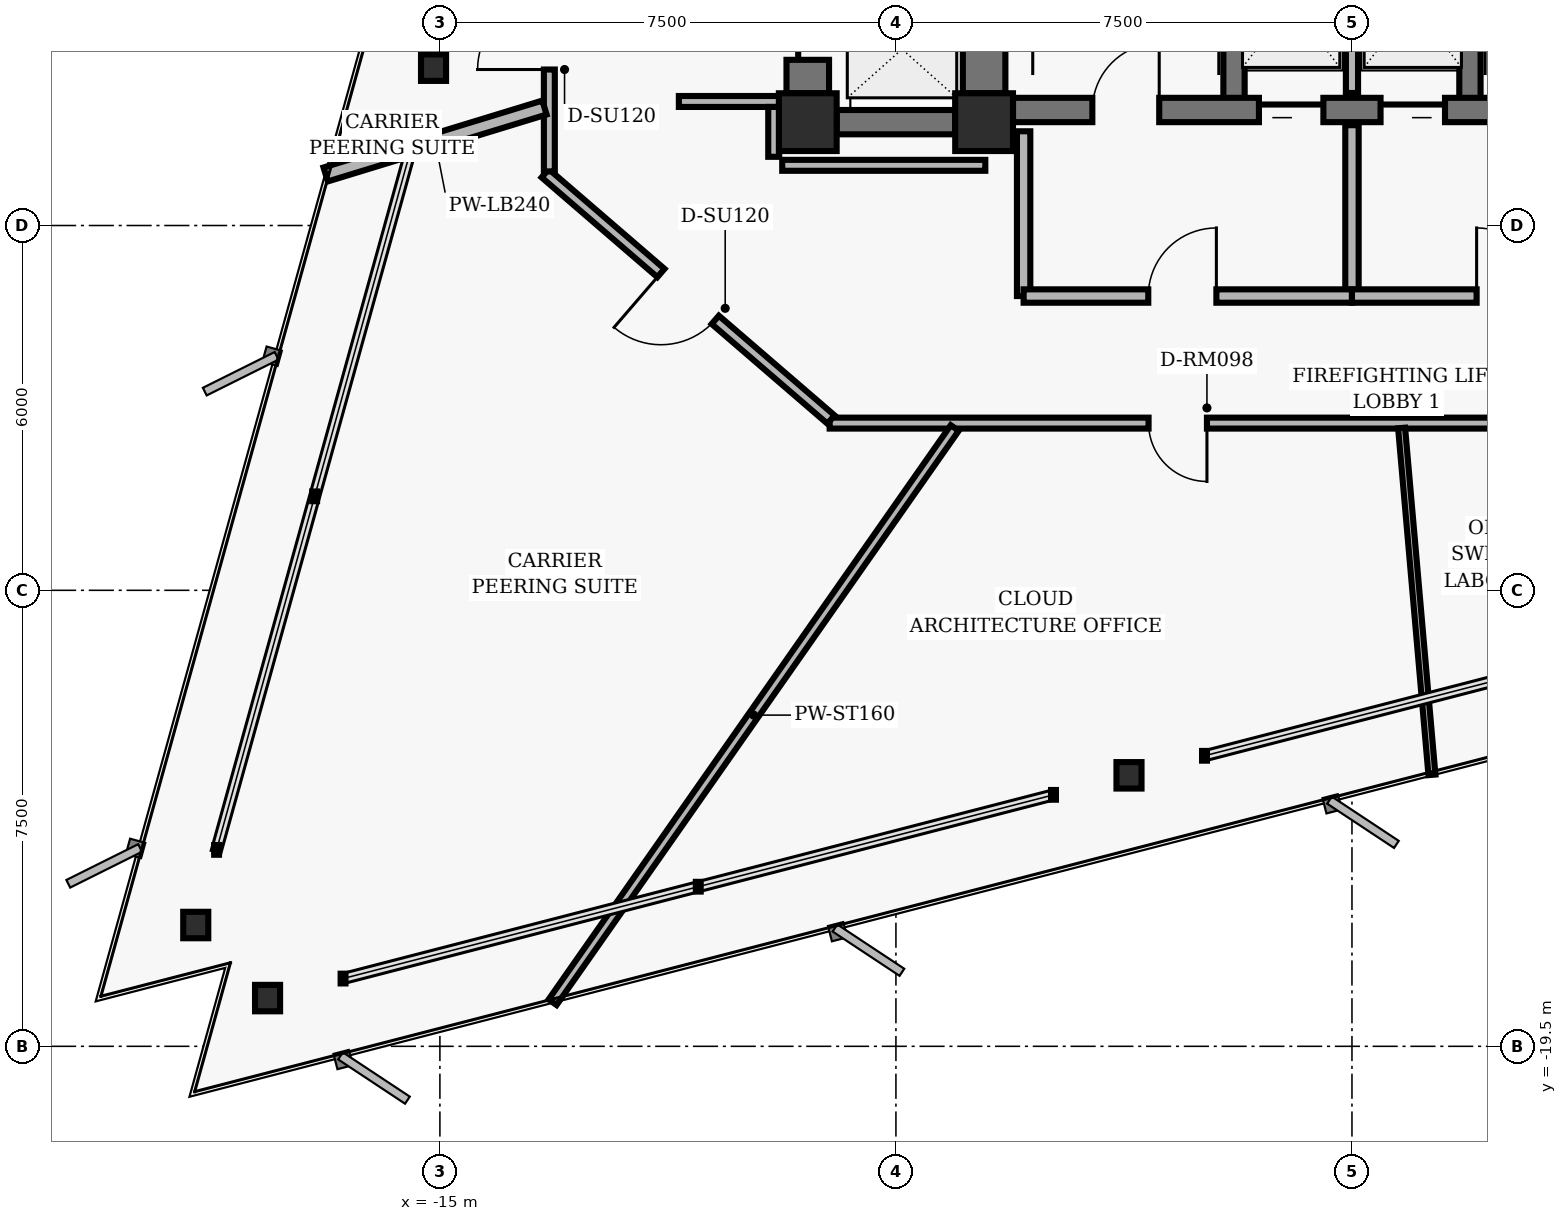
"""IFC4 building model, lengths in metres.
Left out: names, types, materials, properties, quantities, classifications, styles, units other than length and angle.
Written with IfcOpenShell. Run it as: python <this file> out.ifc"""

import sys

from ifc_helpers import new_model, si_unit, direction, frame, frame_2d, origin, origin_2d, place, context, subcontext, project, spatial, rectangle, hollow_rectangle, i_section, extrude, element, fill, save


model = new_model("IFC4")
c1 = context("Model", 3, precision=1e-05, world=origin(), true_north=direction((0.0, 1.0)))
c2 = subcontext(c1, "Body", "Model", "MODEL_VIEW")
j1 = project(units=[si_unit("LENGTHUNIT", "METRE"), si_unit("PLANEANGLEUNIT", "RADIAN")], contexts=[c1])
p1 = place(None, origin())
s1 = spatial("IfcSite", under=j1, at=p1, CompositionType="ELEMENT")
p2 = place(p1, origin())
s2 = spatial("IfcBuilding", under=s1, at=p2, CompositionType="ELEMENT")
p3 = place(p2, frame((0.0, 0.0, 94.72)))
s3 = spatial("IfcBuildingStorey", under=s2, at=p3, CompositionType="ELEMENT", Elevation=94.72)
for number, where, z_axis, x_axis in (
    (1, (-6.05, -4.3, 0.0), (0.0, 0.0, 1.0), (1.0, 0.0, 0.0)),
    (2, (-8.95, -4.3, 0.0), (0.0, 0.0, 1.0), (1.0, 0.0, 0.0)),
):
    element("IfcColumn", number, at=place(p3, frame(where, z_axis=z_axis, x_axis=x_axis)), inside=s3, PredefinedType="COLUMN", context=c2, shape_type="SweptSolid", body=[
        extrude(hollow_rectangle(XDim=0.95, YDim=0.95, WallThickness=0.06, InnerFilletRadius=0.02, OuterFilletRadius=0.04, at=origin_2d()), origin(), (0.0, 0.0, 1.0), 3.04),
    ])
p4 = place(p3, frame((-6.05, -3.825, 0.0), z_axis=(0.0, 0.0, 1.0), x_axis=(0.0, 1.0, 0.0)))
e3 = element("IfcWall", 3, at=p4, inside=s3, PredefinedType="SHEAR", context=c2, shape_type="SweptSolid", body=[
    extrude(rectangle(XDim=3.35, YDim=0.7, at=frame_2d((1.675, 0.0))), origin(), (0.0, 0.0, 1.0), 2.788),
])
for number, where, z_axis, x_axis in (
    (4, (-1.94, -4.1, 0.0), (0.0, 0.0, 1.0), (0.0, 1.0, 0.0)),
    (5, (1.94, -4.1, 0.0), (0.0, 0.0, 1.0), (0.0, 1.0, 0.0)),
):
    element("IfcWall", number, at=place(p3, frame(where, z_axis=z_axis, x_axis=x_axis)), inside=s3, PredefinedType="SHEAR", context=c2, shape_type="SweptSolid", body=[
        extrude(rectangle(XDim=8.2, YDim=0.35, at=frame_2d((4.1, 0.0))), origin(), (0.0, 0.0, 1.0), 2.788),
    ])
p5 = place(p3, frame((-5.575, -4.1, 0.0), z_axis=(0.0, 0.0, 1.0), x_axis=(1.0, 0.0, 0.0)))
e6 = element("IfcWall", 6, at=p5, inside=s3, PredefinedType="SHEAR", context=c2, shape_type="SweptSolid", body=[
    extrude(rectangle(XDim=11.15, YDim=0.4, at=frame_2d((5.575, 0.0))), origin(), (0.0, 0.0, 1.0), 2.788),
])
p6 = place(p5, frame((1.305, 0.0, 0.0)))
e7 = element("IfcOpeningElement", 7, at=p6, cuts=e6, PredefinedType="OPENING", context=c2, shape_type="SweptSolid", body=[
    extrude(rectangle(XDim=1.1, YDim=2.04, at=frame_2d((0.55, 1.02))), frame((0.0, 0.21, 0.0), z_axis=(0.0, -1.0, 0.0), x_axis=(1.0, 0.0, 0.0)), (0.0, 0.0, 1.0), 0.42),
])
p7 = place(p5, frame((8.745, 0.0, 0.0)))
e8 = element("IfcOpeningElement", 8, at=p7, cuts=e6, PredefinedType="OPENING", context=c2, shape_type="SweptSolid", body=[
    extrude(rectangle(XDim=1.1, YDim=2.04, at=frame_2d((0.55, 1.02))), frame((0.0, 0.21, 0.0), z_axis=(0.0, -1.0, 0.0), x_axis=(1.0, 0.0, 0.0)), (0.0, 0.0, 1.0), 0.42),
])
p8 = place(p5, frame((4.045, 0.0, 0.0)))
e9 = element("IfcOpeningElement", 9, at=p8, cuts=e6, PredefinedType="OPENING", context=c2, shape_type="SweptSolid", body=[
    extrude(rectangle(XDim=1.06, YDim=2.04, at=frame_2d((0.53, 1.02))), frame((0.0, 0.21, 0.0), z_axis=(0.0, -1.0, 0.0), x_axis=(1.0, 0.0, 0.0)), (0.0, 0.0, 1.0), 0.42),
])
p9 = place(p5, frame((6.045, 0.0, 0.0)))
e10 = element("IfcOpeningElement", 10, at=p9, cuts=e6, PredefinedType="OPENING", context=c2, shape_type="SweptSolid", body=[
    extrude(rectangle(XDim=1.06, YDim=2.04, at=frame_2d((0.53, 1.02))), frame((0.0, 0.21, 0.0), z_axis=(0.0, -1.0, 0.0), x_axis=(1.0, 0.0, 0.0)), (0.0, 0.0, 1.0), 0.42),
])
p10 = place(p3, frame((-8.95, -3.825, 0.0), z_axis=(0.0, 0.0, 1.0), x_axis=(0.0, 1.0, 0.0)))
e11 = element("IfcWall", 11, at=p10, inside=s3, PredefinedType="SHEAR", context=c2, shape_type="SweptSolid", body=[
    extrude(rectangle(XDim=7.85, YDim=0.7, at=frame_2d((3.925, 0.0))), origin(), (0.0, 0.0, 1.0), 2.788),
])
p11 = place(p10, frame((0.55, 0.0, 0.0)))
e12 = element("IfcOpeningElement", 12, at=p11, cuts=e11, PredefinedType="OPENING", context=c2, shape_type="SweptSolid", body=[
    extrude(rectangle(XDim=1.06, YDim=2.04, at=frame_2d((0.53, 1.02))), frame((0.0, 0.36, 0.0), z_axis=(0.0, -1.0, 0.0), x_axis=(1.0, 0.0, 0.0)), (0.0, 0.0, 1.0), 0.72),
])
p12 = place(p10, frame((3.395, 0.0, 0.0)))
e13 = element("IfcOpeningElement", 13, at=p12, cuts=e11, PredefinedType="OPENING", context=c2, shape_type="SweptSolid", body=[
    extrude(rectangle(XDim=1.06, YDim=2.04, at=frame_2d((0.53, 1.02))), frame((0.0, 0.36, 0.0), z_axis=(0.0, -1.0, 0.0), x_axis=(1.0, 0.0, 0.0)), (0.0, 0.0, 1.0), 0.72),
])
p13 = place(p10, frame((6.23, 0.0, 0.0)))
e14 = element("IfcOpeningElement", 14, at=p13, cuts=e11, PredefinedType="OPENING", context=c2, shape_type="SweptSolid", body=[
    extrude(rectangle(XDim=1.06, YDim=2.04, at=frame_2d((0.53, 1.02))), frame((0.0, 0.36, 0.0), z_axis=(0.0, -1.0, 0.0), x_axis=(1.0, 0.0, 0.0)), (0.0, 0.0, 1.0), 0.72),
])
p14 = place(p3, frame((-8.475, -4.3, 0.0), z_axis=(0.0, 0.0, 1.0), x_axis=(1.0, 0.0, 0.0)))
e15 = element("IfcWall", 15, at=p14, inside=s3, PredefinedType="SHEAR", context=c2, shape_type="SweptSolid", body=[
    extrude(rectangle(XDim=1.95, YDim=0.4, at=frame_2d((0.975, 0.0))), origin(), (0.0, 0.0, 1.0), 2.788),
])
for number, where, z_axis, x_axis in (
    (16, (-15.104, -3.404, 0.0), (0.0, 0.0, 1.0), (1.0, 0.0, 0.0)),
    (17, (-19.015, -17.505, 0.0), (0.0, 0.0, 1.0), (1.0, 0.0, 0.0)),
    (18, (-17.834, -18.707, 0.0), (0.0, 0.0, 1.0), (1.0, 0.0, 0.0)),
    (19, (-3.667, -15.043, 0.0), (0.0, 0.0, 1.0), (1.0, 0.0, 0.0)),
):
    element("IfcColumn", number, at=place(p3, frame(where, z_axis=z_axis, x_axis=x_axis)), inside=s3, PredefinedType="COLUMN", context=c2, shape_type="SweptSolid", body=[
        extrude(i_section(OverallWidth=0.412, OverallDepth=0.435, WebThickness=0.036, FlangeThickness=0.057, FilletRadius=0.022, at=origin_2d()), origin(), (0.0, 0.0, 1.0), 3.04),
    ])
p15 = place(p3, frame((0.0, -3.82, 0.0), z_axis=(0.0, 0.0, 1.0), x_axis=(0.0, 1.0, 0.0)))
e20 = element("IfcWall", 20, at=p15, inside=s3, PredefinedType="PARTITIONING", context=c2, shape_type="SweptSolid", body=[
    extrude(rectangle(XDim=2.67, YDim=0.2, at=frame_2d((1.335, 0.0))), origin(), (0.0, 0.0, 1.0), 2.763),
])
p16 = place(p3, frame((-5.4, -7.16, 0.0), z_axis=(0.0, 0.0, 1.0), x_axis=(0.0, 1.0, 0.0)))
e21 = element("IfcWall", 21, at=p16, inside=s3, PredefinedType="PARTITIONING", context=c2, shape_type="SweptSolid", body=[
    extrude(rectangle(XDim=2.71, YDim=0.22, at=frame_2d((1.355, 0.0))), origin(), (0.0, 0.0, 1.0), 2.763),
])
p17 = place(p3, frame((0.0, -7.16, 0.0), z_axis=(0.0, 0.0, 1.0), x_axis=(0.0, 1.0, 0.0)))
e22 = element("IfcWall", 22, at=p17, inside=s3, PredefinedType="PARTITIONING", context=c2, shape_type="SweptSolid", body=[
    extrude(rectangle(XDim=2.81, YDim=0.22, at=frame_2d((1.405, 0.0))), origin(), (0.0, 0.0, 1.0), 2.763),
])
p18 = place(p3, frame((-5.4, -7.16, 0.0), z_axis=(0.0, 0.0, 1.0), x_axis=(1.0, 0.0, 0.0)))
e23 = element("IfcWall", 23, at=p18, inside=s3, PredefinedType="PARTITIONING", context=c2, shape_type="SweptSolid", body=[
    extrude(rectangle(XDim=5.4, YDim=0.22, at=frame_2d((2.7, 0.0))), origin(), (0.0, 0.0, 1.0), 2.763),
])
p19 = place(p18, frame((2.05, 0.0, 0.0)))
e24 = element("IfcOpeningElement", 24, at=p19, cuts=e23, PredefinedType="OPENING", context=c2, shape_type="SweptSolid", body=[
    extrude(rectangle(XDim=1.12, YDim=2.02, at=frame_2d((0.56, 1.01))), frame((0.0, 0.12, 0.0), z_axis=(0.0, -1.0, 0.0), x_axis=(1.0, 0.0, 0.0)), (0.0, 0.0, 1.0), 0.24),
])
p20 = place(p3, frame((0.0, -7.16, 0.0), z_axis=(0.0, 0.0, 1.0), x_axis=(1.0, 0.0, 0.0)))
e25 = element("IfcWall", 25, at=p20, inside=s3, PredefinedType="PARTITIONING", context=c2, shape_type="SweptSolid", body=[
    extrude(rectangle(XDim=5.4, YDim=0.22, at=frame_2d((2.7, 0.0))), origin(), (0.0, 0.0, 1.0), 2.763),
])
p21 = place(p20, frame((2.05, 0.0, 0.0)))
e26 = element("IfcOpeningElement", 26, at=p21, cuts=e25, PredefinedType="OPENING", context=c2, shape_type="SweptSolid", body=[
    extrude(rectangle(XDim=1.12, YDim=2.02, at=frame_2d((0.56, 1.01))), frame((0.0, 0.12, 0.0), z_axis=(0.0, -1.0, 0.0), x_axis=(1.0, 0.0, 0.0)), (0.0, 0.0, 1.0), 0.24),
])
p22 = place(p3, frame((8.41, -9.25, 0.0), z_axis=(0.0, 0.0, 1.0), x_axis=(-1.0, 0.0, 0.0)))
e27 = element("IfcWall", 27, at=p22, inside=s3, PredefinedType="PARTITIONING", context=c2, shape_type="SweptSolid", body=[
    extrude(rectangle(XDim=17.0, YDim=0.18, at=frame_2d((8.5, 0.0))), origin(), (0.0, 0.0, 1.0), 2.277),
])
p23 = place(p22, frame((10.795, 0.0, 0.0)))
e28 = element("IfcOpeningElement", 28, at=p23, cuts=e27, PredefinedType="OPENING", context=c2, shape_type="SweptSolid", body=[
    extrude(rectangle(XDim=0.96, YDim=2.02, at=frame_2d((0.48, 1.01))), frame((0.0, 0.1, 0.0), z_axis=(0.0, -1.0, 0.0), x_axis=(1.0, 0.0, 0.0)), (0.0, 0.0, 1.0), 0.2),
])
p24 = place(p22, frame((3.417, 0.0, 0.0)))
e29 = element("IfcOpeningElement", 29, at=p24, cuts=e27, PredefinedType="OPENING", context=c2, shape_type="SweptSolid", body=[
    extrude(rectangle(XDim=1.02, YDim=2.02, at=frame_2d((0.51, 1.01))), frame((0.0, 0.1, 0.0), z_axis=(0.0, -1.0, 0.0), x_axis=(1.0, 0.0, 0.0)), (0.0, 0.0, 1.0), 0.2),
])
p25 = place(p3, frame((-8.568, -9.191, 0.0), z_axis=(0.0, 0.0, 1.0), x_axis=(-0.757556899173, 0.652769135694, 0.0)))
e30 = element("IfcWall", 30, at=p25, inside=s3, PredefinedType="PARTITIONING", context=c2, shape_type="SweptSolid", body=[
    extrude(rectangle(XDim=6.204, YDim=0.18, at=frame_2d((3.102, 0.0))), origin(), (0.0, 0.0, 1.0), 2.763),
])
p26 = place(p25, frame((2.512, 0.0, 0.0)))
e31 = element("IfcOpeningElement", 31, at=p26, cuts=e30, PredefinedType="OPENING", context=c2, shape_type="SweptSolid", body=[
    extrude(rectangle(XDim=1.18, YDim=2.02, at=frame_2d((0.59, 1.01))), frame((0.0, 0.1, 0.0), z_axis=(0.0, -1.0, 0.0), x_axis=(1.0, 0.0, 0.0)), (0.0, 0.0, 1.0), 0.2),
])
p27 = place(p3, frame((-13.2, -5.11, 0.0), z_axis=(0.0, 0.0, 1.0), x_axis=(0.0, 1.0, 0.0)))
e32 = element("IfcWall", 32, at=p27, inside=s3, PredefinedType="PARTITIONING", context=c2, shape_type="SweptSolid", body=[
    extrude(rectangle(XDim=10.22, YDim=0.18, at=frame_2d((5.11, 0.0))), origin(), (0.0, 0.0, 1.0), 2.143),
])
p28 = place(p27, frame((1.676, 0.0, 0.0)))
e33 = element("IfcOpeningElement", 33, at=p28, cuts=e32, PredefinedType="OPENING", context=c2, shape_type="SweptSolid", body=[
    extrude(rectangle(XDim=1.18, YDim=2.02, at=frame_2d((0.59, 1.01))), frame((0.0, 0.1, 0.0), z_axis=(0.0, -1.0, 0.0), x_axis=(1.0, 0.0, 0.0)), (0.0, 0.0, 1.0), 0.2),
])
p29 = place(p27, frame((5.99, 0.0, 0.0)))
e34 = element("IfcOpeningElement", 34, at=p29, cuts=e32, PredefinedType="OPENING", context=c2, shape_type="SweptSolid", body=[
    extrude(rectangle(XDim=1.18, YDim=2.02, at=frame_2d((0.59, 1.01))), frame((0.0, 0.1, 0.0), z_axis=(0.0, -1.0, 0.0), x_axis=(1.0, 0.0, 0.0)), (0.0, 0.0, 1.0), 0.2),
])
p30 = place(p3, frame((-11.07, -3.96, 0.0), z_axis=(0.0, 0.0, 1.0), x_axis=(1.0, 0.0, 0.0)))
e35 = element("IfcWall", 35, at=p30, inside=s3, PredefinedType="PARTITIONING", context=c2, shape_type="SweptSolid", body=[
    extrude(rectangle(XDim=1.65, YDim=0.18, at=frame_2d((0.825, 0.0))), origin(), (0.0, 0.0, 1.0), 2.048),
])
p31 = place(p3, frame((-9.51, -4.05, 0.0), z_axis=(0.0, 0.0, 1.0), x_axis=(0.0, -1.0, 0.0)))
e36 = element("IfcWall", 36, at=p31, inside=s3, PredefinedType="PARTITIONING", context=c2, shape_type="SweptSolid", body=[
    extrude(rectangle(XDim=0.82, YDim=0.18, at=frame_2d((0.41, 0.0))), origin(), (0.0, 0.0, 1.0), 2.763),
])
p32 = place(p3, frame((-9.37, -5.01, 0.0), z_axis=(0.0, 0.0, 1.0), x_axis=(1.0, 0.0, 0.0)))
e37 = element("IfcWall", 37, at=p32, inside=s3, PredefinedType="PARTITIONING", context=c2, shape_type="SweptSolid", body=[
    extrude(rectangle(XDim=3.34, YDim=0.18, at=frame_2d((1.67, 0.0))), origin(), (0.0, 0.0, 1.0), 2.763),
])
p33 = place(p3, frame((-13.28, -4.06, 0.0), z_axis=(0.0, 0.0, 1.0), x_axis=(-0.956289598412, -0.292421278244, 0.0)))
e38 = element("IfcWall", 38, at=p33, inside=s3, PredefinedType="PARTITIONING", context=c2, shape_type="SweptSolid", body=[
    extrude(rectangle(XDim=3.763, YDim=0.24, at=frame_2d((1.881, 0.0))), origin(), (0.0, 0.0, 1.0), 2.763),
])
p34 = place(p3, frame((-6.533, -9.33, 0.0), z_axis=(0.0, 0.0, 1.0), x_axis=(-0.573567496354, -0.81915830407, 0.0)))
e39 = element("IfcWall", 39, at=p34, inside=s3, PredefinedType="PARTITIONING", context=c2, shape_type="SweptSolid", body=[
    extrude(rectangle(XDim=11.531, YDim=0.16, at=frame_2d((5.765, 0.0))), origin(), (0.0, 0.0, 1.0), 2.763),
])
p35 = place(p3, frame((0.816, -9.33, 0.0), z_axis=(0.0, 0.0, 1.0), x_axis=(0.087137335428, -0.996196308352, 0.0)))
e40 = element("IfcWall", 40, at=p35, inside=s3, PredefinedType="MOVABLE", context=c2, shape_type="SweptSolid", body=[
    extrude(rectangle(XDim=5.727, YDim=0.115, at=frame_2d((2.863, 0.0))), origin(), (0.0, 0.0, 1.0), 2.763),
])
p36 = place(p6, origin())
e41 = element("IfcDoor", 41, at=p36, inside=s3, OperationType="SINGLE_SWING_RIGHT", PredefinedType="DOOR", context=c2, shape_type="SweptSolid", body=[
    extrude(rectangle(XDim=1.1, YDim=2.04, at=frame_2d((0.55, 1.02))), frame((0.0, 0.025, 0.0), z_axis=(0.0, -1.0, 0.0), x_axis=(1.0, 0.0, 0.0)), (0.0, 0.0, 1.0), 0.05),
])
fill(e7, e41)
p37 = place(p8, origin())
e42 = element("IfcDoor", 42, at=p37, inside=s3, OperationType="SLIDING_TO_LEFT", PredefinedType="DOOR", context=c2, shape_type="SweptSolid", body=[
    extrude(rectangle(XDim=1.06, YDim=2.04, at=frame_2d((0.53, 1.02))), frame((0.0, 0.025, 0.0), z_axis=(0.0, -1.0, 0.0), x_axis=(1.0, 0.0, 0.0)), (0.0, 0.0, 1.0), 0.05),
])
fill(e9, e42)
p38 = place(p9, origin())
e43 = element("IfcDoor", 43, at=p38, inside=s3, OperationType="SLIDING_TO_RIGHT", PredefinedType="DOOR", context=c2, shape_type="SweptSolid", body=[
    extrude(rectangle(XDim=1.06, YDim=2.04, at=frame_2d((0.53, 1.02))), frame((0.0, 0.025, 0.0), z_axis=(0.0, -1.0, 0.0), x_axis=(1.0, 0.0, 0.0)), (0.0, 0.0, 1.0), 0.05),
])
fill(e10, e43)
p39 = place(p19, origin())
e44 = element("IfcDoor", 44, at=p39, inside=s3, OperationType="SINGLE_SWING_RIGHT", PredefinedType="DOOR", context=c2, shape_type="SweptSolid", body=[
    extrude(rectangle(XDim=1.12, YDim=2.02, at=frame_2d((0.56, 1.01))), frame((0.0, 0.025, 0.0), z_axis=(0.0, -1.0, 0.0), x_axis=(1.0, 0.0, 0.0)), (0.0, 0.0, 1.0), 0.05),
])
fill(e24, e44)
p40 = place(p21, origin())
e45 = element("IfcDoor", 45, at=p40, inside=s3, OperationType="SINGLE_SWING_LEFT", PredefinedType="DOOR", context=c2, shape_type="SweptSolid", body=[
    extrude(rectangle(XDim=1.12, YDim=2.02, at=frame_2d((0.56, 1.01))), frame((0.0, 0.025, 0.0), z_axis=(0.0, -1.0, 0.0), x_axis=(1.0, 0.0, 0.0)), (0.0, 0.0, 1.0), 0.05),
])
fill(e26, e45)
p41 = place(p11, origin())
e46 = element("IfcDoor", 46, at=p41, inside=s3, OperationType="SLIDING_TO_LEFT", PredefinedType="DOOR", context=c2, shape_type="SweptSolid", body=[
    extrude(rectangle(XDim=1.06, YDim=2.04, at=frame_2d((0.53, 1.02))), frame((0.0, 0.025, 0.0), z_axis=(0.0, -1.0, 0.0), x_axis=(1.0, 0.0, 0.0)), (0.0, 0.0, 1.0), 0.05),
])
fill(e12, e46)
p42 = place(p28, origin())
e47 = element("IfcDoor", 47, at=p42, inside=s3, OperationType="SINGLE_SWING_LEFT", PredefinedType="DOOR", context=c2, shape_type="SweptSolid", body=[
    extrude(rectangle(XDim=1.18, YDim=2.02, at=frame_2d((0.59, 1.01))), frame((0.0, 0.025, 0.0), z_axis=(0.0, -1.0, 0.0), x_axis=(1.0, 0.0, 0.0)), (0.0, 0.0, 1.0), 0.05),
])
fill(e33, e47)
p43 = place(p26, origin())
e48 = element("IfcDoor", 48, at=p43, inside=s3, OperationType="SINGLE_SWING_RIGHT", PredefinedType="DOOR", context=c2, shape_type="SweptSolid", body=[
    extrude(rectangle(XDim=1.18, YDim=2.02, at=frame_2d((0.59, 1.01))), frame((0.0, 0.025, 0.0), z_axis=(0.0, -1.0, 0.0), x_axis=(1.0, 0.0, 0.0)), (0.0, 0.0, 1.0), 0.05),
])
fill(e31, e48)
p44 = place(p23, origin())
e49 = element("IfcDoor", 49, at=p44, inside=s3, OperationType="SINGLE_SWING_LEFT", PredefinedType="DOOR", context=c2, shape_type="SweptSolid", body=[
    extrude(rectangle(XDim=0.96, YDim=2.02, at=frame_2d((0.48, 1.01))), frame((0.0, 0.025, 0.0), z_axis=(0.0, -1.0, 0.0), x_axis=(1.0, 0.0, 0.0)), (0.0, 0.0, 1.0), 0.05),
])
fill(e28, e49)
save(model, sys.argv[1])
